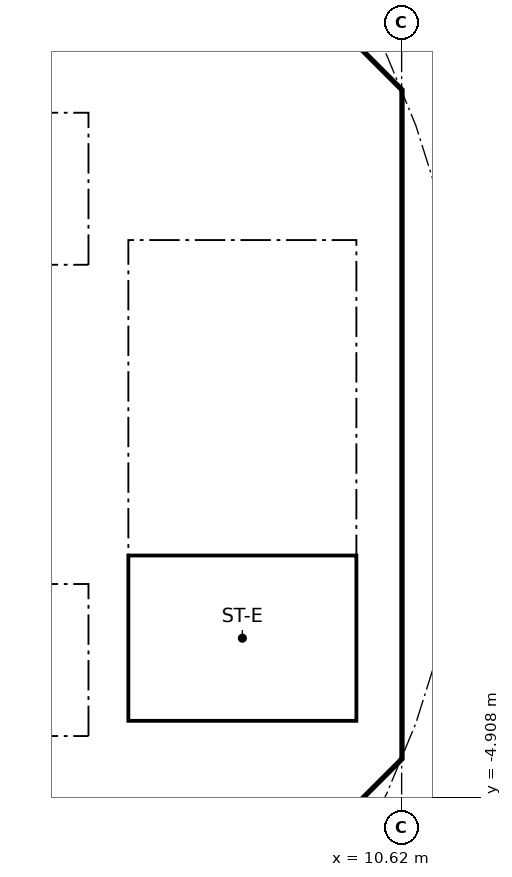
"""IFC4 building model, lengths in metres.
Left out: names, types, materials, properties, quantities, classifications, styles, units other than length and angle.
Written with IfcOpenShell. Run it as: python <this file> out.ifc"""

import sys

from ifc_helpers import new_model, si_unit, direction, frame, frame_2d, origin, place, context, subcontext, project, spatial, polyline, rectangle, outline, extrude, element, fill, save


model = new_model("IFC4")
c1 = context("Model", 3, precision=1e-05, world=origin(), true_north=direction((0.0, 1.0)))
c2 = subcontext(c1, "Body", "Model", "MODEL_VIEW")
j1 = project(units=[si_unit("LENGTHUNIT", "METRE"), si_unit("PLANEANGLEUNIT", "RADIAN")], contexts=[c1])
p1 = place(None, origin())
s1 = spatial("IfcSite", under=j1, at=p1, CompositionType="ELEMENT")
p2 = place(p1, origin())
s2 = spatial("IfcBuilding", under=s1, at=p2, CompositionType="ELEMENT")
p3 = place(p2, frame((0.0, 0.0, 310.3)))
s3 = spatial("IfcBuildingStorey", under=s2, at=p3, CompositionType="ELEMENT", Elevation=310.3)
p4 = place(p3, frame((9.988, 4.613, 0.0), z_axis=(0.0, 0.0, 1.0), x_axis=(-0.707106781187, 0.707106781187, 0.0)))
e1 = element("IfcWall", 1, at=p4, inside=s3, PredefinedType="SHEAR", context=c2, shape_type="SweptSolid", body=[
    extrude(rectangle(XDim=7.602, YDim=0.6, at=frame_2d((3.801, 0.0))), origin(), (0.0, 0.0, 1.0), 5.3),
])
p5 = place(p4, frame((3.201, 0.0, 0.0)))
e2 = element("IfcOpeningElement", 2, at=p5, cuts=e1, PredefinedType="OPENING", context=c2, shape_type="SweptSolid", body=[
    extrude(rectangle(XDim=1.2, YDim=2.1, at=frame_2d((0.6, 1.05))), frame((0.0, 0.31, 0.0), z_axis=(0.0, -1.0, 0.0), x_axis=(1.0, 0.0, 0.0)), (0.0, 0.0, 1.0), 0.62),
])
p6 = place(p3, frame((4.613, -9.988, 0.0), z_axis=(0.0, 0.0, 1.0), x_axis=(0.707106781187, 0.707106781187, 0.0)))
e3 = element("IfcWall", 3, at=p6, inside=s3, PredefinedType="SHEAR", context=c2, shape_type="SweptSolid", body=[
    extrude(rectangle(XDim=7.602, YDim=0.6, at=frame_2d((3.801, 0.0))), origin(), (0.0, 0.0, 1.0), 5.3),
])
p7 = place(p6, frame((3.201, 0.0, 0.0)))
e4 = element("IfcOpeningElement", 4, at=p7, cuts=e3, PredefinedType="OPENING", context=c2, shape_type="SweptSolid", body=[
    extrude(rectangle(XDim=1.2, YDim=2.1, at=frame_2d((0.6, 1.05))), frame((0.0, 0.31, 0.0), z_axis=(0.0, -1.0, 0.0), x_axis=(1.0, 0.0, 0.0)), (0.0, 0.0, 1.0), 0.62),
])
p8 = place(p3, frame((-6.7, 2.0, 0.0), z_axis=(0.0, 0.0, 1.0), x_axis=(1.0, 0.0, 0.0)))
e5 = element("IfcWall", 5, at=p8, inside=s3, PredefinedType="SOLIDWALL", context=c2, shape_type="SweptSolid", body=[
    extrude(rectangle(XDim=13.4, YDim=0.2, at=frame_2d((6.7, 0.0))), origin(), (0.0, 0.0, 1.0), 5.3),
])
p9 = place(p8, frame((11.65, 0.0, 0.0)))
e6 = element("IfcOpeningElement", 6, at=p9, cuts=e5, PredefinedType="OPENING", context=c2, shape_type="SweptSolid", body=[
    extrude(rectangle(XDim=1.1, YDim=2.1, at=frame_2d((0.55, 1.05))), frame((0.0, 0.11, 0.0), z_axis=(0.0, -1.0, 0.0), x_axis=(1.0, 0.0, 0.0)), (0.0, 0.0, 1.0), 0.22),
])
p10 = place(p8, frame((0.75, 0.0, 0.0)))
e7 = element("IfcOpeningElement", 7, at=p10, cuts=e5, PredefinedType="OPENING", context=c2, shape_type="SweptSolid", body=[
    extrude(rectangle(XDim=0.9, YDim=2.1, at=frame_2d((0.45, 1.05))), frame((0.0, 0.11, 0.0), z_axis=(0.0, -1.0, 0.0), x_axis=(1.0, 0.0, 0.0)), (0.0, 0.0, 1.0), 0.22),
])
p11 = place(p8, frame((4.05, 0.0, 0.0)))
e8 = element("IfcOpeningElement", 8, at=p11, cuts=e5, PredefinedType="OPENING", context=c2, shape_type="SweptSolid", body=[
    extrude(rectangle(XDim=0.9, YDim=2.1, at=frame_2d((0.45, 1.05))), frame((0.0, 0.11, 0.0), z_axis=(0.0, -1.0, 0.0), x_axis=(1.0, 0.0, 0.0)), (0.0, 0.0, 1.0), 0.22),
])
p12 = place(p8, frame((7.35, 0.0, 0.0)))
e9 = element("IfcOpeningElement", 9, at=p12, cuts=e5, PredefinedType="OPENING", context=c2, shape_type="SweptSolid", body=[
    extrude(rectangle(XDim=0.9, YDim=2.1, at=frame_2d((0.45, 1.05))), frame((0.0, 0.11, 0.0), z_axis=(0.0, -1.0, 0.0), x_axis=(1.0, 0.0, 0.0)), (0.0, 0.0, 1.0), 0.22),
])
p13 = place(p8, frame((9.55, 0.0, 0.0)))
e10 = element("IfcOpeningElement", 10, at=p13, cuts=e5, PredefinedType="OPENING", context=c2, shape_type="SweptSolid", body=[
    extrude(rectangle(XDim=0.9, YDim=2.1, at=frame_2d((0.45, 1.05))), frame((0.0, 0.11, 0.0), z_axis=(0.0, -1.0, 0.0), x_axis=(1.0, 0.0, 0.0)), (0.0, 0.0, 1.0), 0.22),
])
p14 = place(p3, frame((6.7, 4.0, 0.0), z_axis=(0.0, 0.0, 1.0), x_axis=(1.0, 0.0, 0.0)))
e11 = element("IfcWall", 11, at=p14, inside=s3, PredefinedType="SOLIDWALL", context=c2, shape_type="SweptSolid", body=[
    extrude(rectangle(XDim=3.325, YDim=0.2, at=frame_2d((1.662, 0.0))), origin(), (0.0, 0.0, 1.0), 5.3),
])
p15 = place(p14, frame((1.25, 0.0, 0.0)))
e12 = element("IfcOpeningElement", 12, at=p15, cuts=e11, PredefinedType="OPENING", context=c2, shape_type="SweptSolid", body=[
    extrude(rectangle(XDim=1.1, YDim=2.1, at=frame_2d((0.55, 1.05))), frame((0.0, 0.11, 0.0), z_axis=(0.0, -1.0, 0.0), x_axis=(1.0, 0.0, 0.0)), (0.0, 0.0, 1.0), 0.22),
])
p16 = place(p3, frame((-6.7, -2.0, 0.0), z_axis=(0.0, 0.0, 1.0), x_axis=(1.0, 0.0, 0.0)))
e13 = element("IfcWall", 13, at=p16, inside=s3, PredefinedType="SOLIDWALL", context=c2, shape_type="SweptSolid", body=[
    extrude(rectangle(XDim=13.4, YDim=0.2, at=frame_2d((6.7, 0.0))), origin(), (0.0, 0.0, 1.0), 5.3),
])
p17 = place(p16, frame((9.45, 0.0, 0.0)))
e14 = element("IfcOpeningElement", 14, at=p17, cuts=e13, PredefinedType="OPENING", context=c2, shape_type="SweptSolid", body=[
    extrude(rectangle(XDim=1.1, YDim=2.1, at=frame_2d((0.55, 1.05))), frame((0.0, 0.11, 0.0), z_axis=(0.0, -1.0, 0.0), x_axis=(1.0, 0.0, 0.0)), (0.0, 0.0, 1.0), 0.22),
])
p18 = place(p16, frame((11.65, 0.0, 0.0)))
e15 = element("IfcOpeningElement", 15, at=p18, cuts=e13, PredefinedType="OPENING", context=c2, shape_type="SweptSolid", body=[
    extrude(rectangle(XDim=1.1, YDim=2.1, at=frame_2d((0.55, 1.05))), frame((0.0, 0.11, 0.0), z_axis=(0.0, -1.0, 0.0), x_axis=(1.0, 0.0, 0.0)), (0.0, 0.0, 1.0), 0.22),
])
p19 = place(p16, frame((1.85, 0.0, 0.0)))
e16 = element("IfcOpeningElement", 16, at=p19, cuts=e13, PredefinedType="OPENING", context=c2, shape_type="SweptSolid", body=[
    extrude(rectangle(XDim=0.9, YDim=2.1, at=frame_2d((0.45, 1.05))), frame((0.0, 0.11, 0.0), z_axis=(0.0, -1.0, 0.0), x_axis=(1.0, 0.0, 0.0)), (0.0, 0.0, 1.0), 0.22),
])
p20 = place(p16, frame((6.25, 0.0, 0.0)))
e17 = element("IfcOpeningElement", 17, at=p20, cuts=e13, PredefinedType="OPENING", context=c2, shape_type="SweptSolid", body=[
    extrude(rectangle(XDim=0.9, YDim=2.1, at=frame_2d((0.45, 1.05))), frame((0.0, 0.11, 0.0), z_axis=(0.0, -1.0, 0.0), x_axis=(1.0, 0.0, 0.0)), (0.0, 0.0, 1.0), 0.22),
])
p21 = place(p3, origin())
e18 = element("IfcWall", 18, at=p21, inside=s3, PredefinedType="SHEAR", context=c2, shape_type="SweptSolid", body=[
    extrude(outline(polyline([(9.776, -4.401), (10.025, -4.152), (10.025, -3.801), (10.025, 4.152), (9.776, 4.401), (10.2, 4.825), (10.625, 4.401), (10.625, -4.401), (10.2, -4.825), (9.776, -4.401)])), origin(), (0.0, 0.0, 1.0), 5.3),
])
p22 = place(p3, origin())
e19 = element("IfcWall", 19, at=p22, inside=s3, PredefinedType="SOLIDWALL", context=c2, shape_type="SweptSolid", body=[
    extrude(outline(polyline([(-6.7, 4.3), (6.7, 4.3), (6.7, 2.1), (6.5, 2.1), (6.5, 4.1), (4.5, 4.1), (4.5, 2.1), (4.3, 2.1), (4.3, 4.1), (2.3, 4.1), (2.3, 2.1), (2.1, 2.1), (2.1, 4.1), (0.1, 4.1), (0.1, 2.1), (-0.1, 2.1), (-0.1, 4.1), (-4.3, 4.1), (-4.3, 2.1), (-4.5, 2.1), (-4.5, 4.1), (-6.5, 4.1), (-6.5, 2.1), (-6.7, 2.1), (-6.7, 4.3)])), origin(), (0.0, 0.0, 1.0), 5.3),
])
p23 = place(p3, origin())
e20 = element("IfcWall", 20, at=p23, inside=s3, PredefinedType="SOLIDWALL", context=c2, shape_type="SweptSolid", body=[
    extrude(outline(polyline([(-6.7, -2.1), (-6.5, -2.1), (-6.5, -4.1), (-2.3, -4.1), (-2.3, -2.1), (-2.1, -2.1), (-2.1, -4.1), (2.1, -4.1), (2.1, -2.1), (2.3, -2.1), (2.3, -4.1), (4.3, -4.1), (4.3, -2.1), (4.5, -2.1), (4.5, -4.1), (6.5, -4.1), (6.5, -2.1), (6.7, -2.1), (6.7, -4.3), (-6.7, -4.3), (-6.7, -2.1)])), origin(), (0.0, 0.0, 1.0), 5.3),
])
p24 = place(p3, origin())
e21 = element("IfcWall", 21, at=p24, inside=s3, PredefinedType="SOLIDWALL", context=c2, shape_type="SweptSolid", body=[
    extrude(outline(polyline([(7.025, -3.9), (6.7, -3.9), (6.7, 3.9), (7.025, 3.9), (7.025, -3.9)])), origin(), (0.0, 0.0, 1.0), 5.3),
])
p25 = place(p3, origin())
e22 = element("IfcWall", 22, at=p25, inside=s3, PredefinedType="SOLIDWALL", context=c2, shape_type="SweptSolid", body=[
    extrude(outline(polyline([(10.025, -4.1), (6.7, -4.1), (6.7, -3.9), (10.025, -3.9), (10.025, -4.1)])), origin(), (0.0, 0.0, 1.0), 5.3),
])
p26 = place(p9, origin())
e23 = element("IfcDoor", 23, at=p26, inside=s3, OperationType="DOUBLE_DOOR_SLIDING", PredefinedType="DOOR", context=c2, shape_type="SweptSolid", body=[
    extrude(rectangle(XDim=1.1, YDim=2.1, at=frame_2d((0.55, 1.05))), frame((0.0, 0.025, 0.0), z_axis=(0.0, -1.0, 0.0), x_axis=(1.0, 0.0, 0.0)), (0.0, 0.0, 1.0), 0.05),
])
fill(e6, e23)
p27 = place(p18, origin())
e24 = element("IfcDoor", 24, at=p27, inside=s3, OperationType="DOUBLE_DOOR_SLIDING", PredefinedType="DOOR", context=c2, shape_type="SweptSolid", body=[
    extrude(rectangle(XDim=1.1, YDim=2.1, at=frame_2d((0.55, 1.05))), frame((0.0, 0.025, 0.0), z_axis=(0.0, -1.0, 0.0), x_axis=(1.0, 0.0, 0.0)), (0.0, 0.0, 1.0), 0.05),
])
fill(e15, e24)
p28 = place(p15, frame((1.1, 0.0, 0.0), x_axis=(-1.0, 0.0, 0.0)))
e25 = element("IfcDoor", 25, at=p28, inside=s3, OperationType="SINGLE_SWING_RIGHT", PredefinedType="DOOR", context=c2, shape_type="SweptSolid", body=[
    extrude(rectangle(XDim=1.1, YDim=2.1, at=frame_2d((0.55, 1.05))), frame((0.0, 0.025, 0.0), z_axis=(0.0, -1.0, 0.0), x_axis=(1.0, 0.0, 0.0)), (0.0, 0.0, 1.0), 0.05),
])
fill(e12, e25)
save(model, sys.argv[1])
